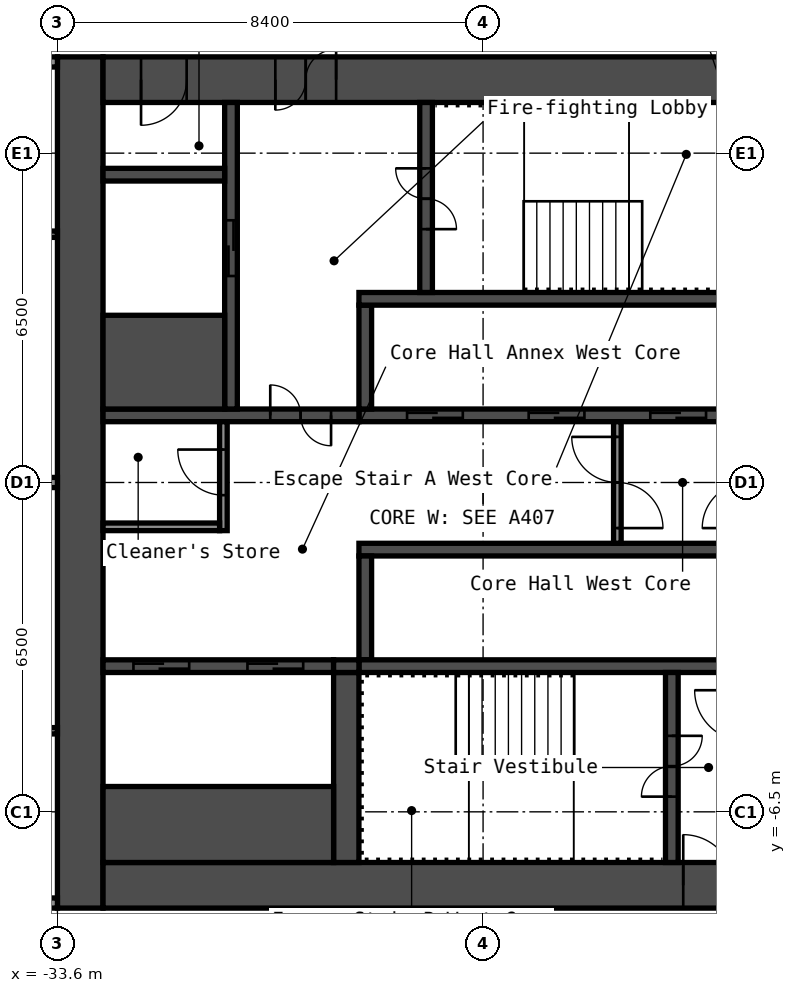
"""IFC4 building model, lengths in metres.
Left out: names, types, materials, properties, quantities, classifications, styles, units other than length and angle.
Written with IfcOpenShell. Run it as: python <this file> out.ifc"""

import sys

from ifc_helpers import new_model, si_unit, direction, frame, frame_2d, origin, place, context, subcontext, project, spatial, rectangle, extrude, element, fill, save


model = new_model("IFC4")
c1 = context("Model", 3, precision=1e-05, world=origin(), true_north=direction((0.0, 1.0)))
c2 = subcontext(c1, "Body", "Model", "MODEL_VIEW")
j1 = project(units=[si_unit("LENGTHUNIT", "METRE"), si_unit("PLANEANGLEUNIT", "RADIAN")], contexts=[c1])
p1 = place(None, origin())
s1 = spatial("IfcSite", under=j1, at=p1, CompositionType="ELEMENT")
p2 = place(p1, origin())
s2 = spatial("IfcBuilding", under=s1, at=p2, CompositionType="ELEMENT")
p3 = place(p2, frame((0.0, 0.0, 51.8)))
s3 = spatial("IfcBuildingStorey", under=s2, at=p3, CompositionType="ELEMENT", Elevation=51.8)
p4 = place(p3, frame((-33.15, -8.4, 0.0), z_axis=(0.0, 0.0, 1.0), x_axis=(0.0, 1.0, 0.0)))
e1 = element("IfcWall", 1, at=p4, inside=s3, PredefinedType="SHEAR", context=c2, shape_type="SweptSolid", body=[
    extrude(rectangle(XDim=16.8, YDim=0.9, at=frame_2d((8.4, 0.0))), origin(), (0.0, 0.0, 1.0), 2.8),
])
p5 = place(p3, frame((-32.7, 7.95, 0.0), z_axis=(0.0, 0.0, 1.0), x_axis=(1.0, 0.0, 0.0)))
e2 = element("IfcWall", 2, at=p5, inside=s3, PredefinedType="SHEAR", context=c2, shape_type="SweptSolid", body=[
    extrude(rectangle(XDim=15.0, YDim=0.9, at=frame_2d((7.5, 0.0))), origin(), (0.0, 0.0, 1.0), 2.8),
])
p6 = place(p5, frame((3.4, 0.0, 0.0)))
e3 = element("IfcOpeningElement", 3, at=p6, cuts=e2, PredefinedType="OPENING", context=c2, shape_type="SweptSolid", body=[
    extrude(rectangle(XDim=1.2, YDim=2.1, at=frame_2d((0.6, 1.05))), frame((0.0, 0.46, 0.0), z_axis=(0.0, -1.0, 0.0), x_axis=(1.0, 0.0, 0.0)), (0.0, 0.0, 1.0), 0.92),
])
p7 = place(p5, frame((0.75, 0.0, 0.0)))
e4 = element("IfcOpeningElement", 4, at=p7, cuts=e2, PredefinedType="OPENING", context=c2, shape_type="SweptSolid", body=[
    extrude(rectangle(XDim=0.9, YDim=2.1, at=frame_2d((0.45, 1.05))), frame((0.0, 0.46, 0.0), z_axis=(0.0, -1.0, 0.0), x_axis=(1.0, 0.0, 0.0)), (0.0, 0.0, 1.0), 0.92),
])
p8 = place(p3, frame((-32.7, -7.95, 0.0), z_axis=(0.0, 0.0, 1.0), x_axis=(1.0, 0.0, 0.0)))
e5 = element("IfcWall", 5, at=p8, inside=s3, PredefinedType="SHEAR", context=c2, shape_type="SweptSolid", body=[
    extrude(rectangle(XDim=15.0, YDim=0.9, at=frame_2d((7.5, 0.0))), origin(), (0.0, 0.0, 1.0), 2.8),
])
p9 = place(p8, frame((11.45, 0.0, 0.0)))
e6 = element("IfcOpeningElement", 6, at=p9, cuts=e5, PredefinedType="OPENING", context=c2, shape_type="SweptSolid", body=[
    extrude(rectangle(XDim=1.0, YDim=2.1, at=frame_2d((0.5, 1.05))), frame((0.0, 0.46, 0.0), z_axis=(0.0, -1.0, 0.0), x_axis=(1.0, 0.0, 0.0)), (0.0, 0.0, 1.0), 0.92),
])
p10 = place(p3, frame((-27.65, 1.325, 0.0), z_axis=(0.0, 0.0, 1.0), x_axis=(1.0, 0.0, 0.0)))
e7 = element("IfcWall", 7, at=p10, inside=s3, PredefinedType="SHEAR", context=c2, shape_type="SweptSolid", body=[
    extrude(rectangle(XDim=7.5, YDim=0.25, at=frame_2d((3.75, 0.0))), origin(), (0.0, 0.0, 1.0), 2.8),
])
p11 = place(p10, frame((5.75, 0.0, 0.0)))
e8 = element("IfcOpeningElement", 8, at=p11, cuts=e7, PredefinedType="OPENING", context=c2, shape_type="SweptSolid", body=[
    extrude(rectangle(XDim=1.1, YDim=2.1, at=frame_2d((0.55, 1.05))), frame((0.0, 0.135, 0.0), z_axis=(0.0, -1.0, 0.0), x_axis=(1.0, 0.0, 0.0)), (0.0, 0.0, 1.0), 0.27),
])
p12 = place(p10, frame((3.35, 0.0, 0.0)))
e9 = element("IfcOpeningElement", 9, at=p12, cuts=e7, PredefinedType="OPENING", context=c2, shape_type="SweptSolid", body=[
    extrude(rectangle(XDim=1.1, YDim=2.1, at=frame_2d((0.55, 1.05))), frame((0.0, 0.135, 0.0), z_axis=(0.0, -1.0, 0.0), x_axis=(1.0, 0.0, 0.0)), (0.0, 0.0, 1.0), 0.27),
])
p13 = place(p10, frame((0.95, 0.0, 0.0)))
e10 = element("IfcOpeningElement", 10, at=p13, cuts=e7, PredefinedType="OPENING", context=c2, shape_type="SweptSolid", body=[
    extrude(rectangle(XDim=1.1, YDim=2.1, at=frame_2d((0.55, 1.05))), frame((0.0, 0.135, 0.0), z_axis=(0.0, -1.0, 0.0), x_axis=(1.0, 0.0, 0.0)), (0.0, 0.0, 1.0), 0.27),
])
p14 = place(p3, frame((-27.525, 1.45, 0.0), z_axis=(0.0, 0.0, 1.0), x_axis=(0.0, 1.0, 0.0)))
e11 = element("IfcWall", 11, at=p14, inside=s3, PredefinedType="SHEAR", context=c2, shape_type="SweptSolid", body=[
    extrude(rectangle(XDim=2.05, YDim=0.25, at=frame_2d((1.025, 0.0))), origin(), (0.0, 0.0, 1.0), 2.8),
])
p15 = place(p3, frame((-27.65, 3.625, 0.0), z_axis=(0.0, 0.0, 1.0), x_axis=(1.0, 0.0, 0.0)))
e12 = element("IfcWall", 12, at=p15, inside=s3, PredefinedType="SHEAR", context=c2, shape_type="SweptSolid", body=[
    extrude(rectangle(XDim=7.5, YDim=0.25, at=frame_2d((3.75, 0.0))), origin(), (0.0, 0.0, 1.0), 2.8),
])
p16 = place(p3, frame((-26.325, 3.75, 0.0), z_axis=(0.0, 0.0, 1.0), x_axis=(0.0, 1.0, 0.0)))
e13 = element("IfcWall", 13, at=p16, inside=s3, PredefinedType="SHEAR", context=c2, shape_type="SweptSolid", body=[
    extrude(rectangle(XDim=3.75, YDim=0.25, at=frame_2d((1.875, 0.0))), origin(), (0.0, 0.0, 1.0), 2.8),
])
p17 = place(p16, frame((1.25, 0.0, 0.0)))
e14 = element("IfcOpeningElement", 14, at=p17, cuts=e13, PredefinedType="OPENING", context=c2, shape_type="SweptSolid", body=[
    extrude(rectangle(XDim=1.2, YDim=2.1, at=frame_2d((0.6, 1.05))), frame((0.0, 0.135, 0.0), z_axis=(0.0, -1.0, 0.0), x_axis=(1.0, 0.0, 0.0)), (0.0, 0.0, 1.0), 0.27),
])
p18 = place(p3, frame((-32.7, 1.325, 0.0), z_axis=(0.0, 0.0, 1.0), x_axis=(1.0, 0.0, 0.0)))
e15 = element("IfcWall", 15, at=p18, inside=s3, PredefinedType="SHEAR", context=c2, shape_type="SweptSolid", body=[
    extrude(rectangle(XDim=5.05, YDim=0.25, at=frame_2d((2.525, 0.0))), origin(), (0.0, 0.0, 1.0), 2.8),
])
p19 = place(p18, frame((3.3, 0.0, 0.0)))
e16 = element("IfcOpeningElement", 16, at=p19, cuts=e15, PredefinedType="OPENING", context=c2, shape_type="SweptSolid", body=[
    extrude(rectangle(XDim=1.2, YDim=2.1, at=frame_2d((0.6, 1.05))), frame((0.0, 0.135, 0.0), z_axis=(0.0, -1.0, 0.0), x_axis=(1.0, 0.0, 0.0)), (0.0, 0.0, 1.0), 0.27),
])
p20 = place(p3, frame((-30.175, 1.45, 0.0), z_axis=(0.0, 0.0, 1.0), x_axis=(0.0, 1.0, 0.0)))
e17 = element("IfcWall", 17, at=p20, inside=s3, PredefinedType="SHEAR", context=c2, shape_type="SweptSolid", body=[
    extrude(rectangle(XDim=6.05, YDim=0.25, at=frame_2d((3.025, 0.0))), origin(), (0.0, 0.0, 1.0), 2.8),
])
p21 = place(p20, frame((2.625, 0.0, 0.0)))
e18 = element("IfcOpeningElement", 18, at=p21, cuts=e17, PredefinedType="OPENING", context=c2, shape_type="SweptSolid", body=[
    extrude(rectangle(XDim=1.1, YDim=2.1, at=frame_2d((0.55, 1.05))), frame((0.0, 0.135, 0.0), z_axis=(0.0, -1.0, 0.0), x_axis=(1.0, 0.0, 0.0)), (0.0, 0.0, 1.0), 0.27),
])
p22 = place(p3, frame((-32.7, 2.375, 0.0), z_axis=(0.0, 0.0, 1.0), x_axis=(1.0, 0.0, 0.0)))
e19 = element("IfcWall", 19, at=p22, inside=s3, PredefinedType="SHEAR", context=c2, shape_type="SweptSolid", body=[
    extrude(rectangle(XDim=2.4, YDim=1.85, at=frame_2d((1.2, 0.0))), origin(), (0.0, 0.0, 1.0), 2.8),
])
p23 = place(p3, frame((-32.7, 6.075, 0.0), z_axis=(0.0, 0.0, 1.0), x_axis=(1.0, 0.0, 0.0)))
e20 = element("IfcWall", 20, at=p23, inside=s3, PredefinedType="SHEAR", context=c2, shape_type="SweptSolid", body=[
    extrude(rectangle(XDim=2.4, YDim=0.25, at=frame_2d((1.2, 0.0))), origin(), (0.0, 0.0, 1.0), 2.8),
])
p24 = place(p3, frame((-27.65, -1.325, 0.0), z_axis=(0.0, 0.0, 1.0), x_axis=(1.0, 0.0, 0.0)))
e21 = element("IfcWall", 21, at=p24, inside=s3, PredefinedType="SHEAR", context=c2, shape_type="SweptSolid", body=[
    extrude(rectangle(XDim=7.5, YDim=0.25, at=frame_2d((3.75, 0.0))), origin(), (0.0, 0.0, 1.0), 2.8),
])
p25 = place(p3, frame((-27.525, -3.5, 0.0), z_axis=(0.0, 0.0, 1.0), x_axis=(0.0, 1.0, 0.0)))
e22 = element("IfcWall", 22, at=p25, inside=s3, PredefinedType="SHEAR", context=c2, shape_type="SweptSolid", body=[
    extrude(rectangle(XDim=2.05, YDim=0.25, at=frame_2d((1.025, 0.0))), origin(), (0.0, 0.0, 1.0), 2.8),
])
p26 = place(p3, frame((-27.65, -3.625, 0.0), z_axis=(0.0, 0.0, 1.0), x_axis=(1.0, 0.0, 0.0)))
e23 = element("IfcWall", 23, at=p26, inside=s3, PredefinedType="SHEAR", context=c2, shape_type="SweptSolid", body=[
    extrude(rectangle(XDim=7.5, YDim=0.25, at=frame_2d((3.75, 0.0))), origin(), (0.0, 0.0, 1.0), 2.8),
])
p27 = place(p3, frame((-21.475, -7.5, 0.0), z_axis=(0.0, 0.0, 1.0), x_axis=(0.0, 1.0, 0.0)))
e24 = element("IfcWall", 24, at=p27, inside=s3, PredefinedType="SHEAR", context=c2, shape_type="SweptSolid", body=[
    extrude(rectangle(XDim=3.75, YDim=0.25, at=frame_2d((1.875, 0.0))), origin(), (0.0, 0.0, 1.0), 2.8),
])
p28 = place(p27, frame((1.3, 0.0, 0.0)))
e25 = element("IfcOpeningElement", 25, at=p28, cuts=e24, PredefinedType="OPENING", context=c2, shape_type="SweptSolid", body=[
    extrude(rectangle(XDim=1.2, YDim=2.1, at=frame_2d((0.6, 1.05))), frame((0.0, 0.135, 0.0), z_axis=(0.0, -1.0, 0.0), x_axis=(1.0, 0.0, 0.0)), (0.0, 0.0, 1.0), 0.27),
])
p29 = place(p3, frame((-27.9, -7.5, 0.0), z_axis=(0.0, 0.0, 1.0), x_axis=(0.0, 1.0, 0.0)))
e26 = element("IfcWall", 26, at=p29, inside=s3, PredefinedType="SHEAR", context=c2, shape_type="SweptSolid", body=[
    extrude(rectangle(XDim=3.75, YDim=0.5, at=frame_2d((1.875, 0.0))), origin(), (0.0, 0.0, 1.0), 2.8),
])
p30 = place(p3, frame((-32.7, -3.625, 0.0), z_axis=(0.0, 0.0, 1.0), x_axis=(1.0, 0.0, 0.0)))
e27 = element("IfcWall", 27, at=p30, inside=s3, PredefinedType="SHEAR", context=c2, shape_type="SweptSolid", body=[
    extrude(rectangle(XDim=4.55, YDim=0.25, at=frame_2d((2.275, 0.0))), origin(), (0.0, 0.0, 1.0), 2.8),
])
p31 = place(p30, frame((2.85, 0.0, 0.0)))
e28 = element("IfcOpeningElement", 28, at=p31, cuts=e27, PredefinedType="OPENING", context=c2, shape_type="SweptSolid", body=[
    extrude(rectangle(XDim=1.1, YDim=2.1, at=frame_2d((0.55, 1.05))), frame((0.0, 0.135, 0.0), z_axis=(0.0, -1.0, 0.0), x_axis=(1.0, 0.0, 0.0)), (0.0, 0.0, 1.0), 0.27),
])
p32 = place(p30, frame((0.6, 0.0, 0.0)))
e29 = element("IfcOpeningElement", 29, at=p32, cuts=e27, PredefinedType="OPENING", context=c2, shape_type="SweptSolid", body=[
    extrude(rectangle(XDim=1.1, YDim=2.1, at=frame_2d((0.55, 1.05))), frame((0.0, 0.135, 0.0), z_axis=(0.0, -1.0, 0.0), x_axis=(1.0, 0.0, 0.0)), (0.0, 0.0, 1.0), 0.27),
])
p33 = place(p3, frame((-32.7, -6.75, 0.0), z_axis=(0.0, 0.0, 1.0), x_axis=(1.0, 0.0, 0.0)))
e30 = element("IfcWall", 30, at=p33, inside=s3, PredefinedType="SHEAR", context=c2, shape_type="SweptSolid", body=[
    extrude(rectangle(XDim=4.55, YDim=1.5, at=frame_2d((2.275, 0.0))), origin(), (0.0, 0.0, 1.0), 2.8),
])
p34 = place(p3, frame((-28.15, -3.625, 0.0), z_axis=(0.0, 0.0, 1.0), x_axis=(1.0, 0.0, 0.0)))
e31 = element("IfcWall", 31, at=p34, inside=s3, PredefinedType="SHEAR", context=c2, shape_type="SweptSolid", body=[
    extrude(rectangle(XDim=0.5, YDim=0.25, at=frame_2d((0.25, 0.0))), origin(), (0.0, 0.0, 1.0), 2.8),
])
p35 = place(p3, frame((-22.55, -1.2, 0.0), z_axis=(0.0, 0.0, 1.0), x_axis=(0.0, 1.0, 0.0)))
e32 = element("IfcWall", 32, at=p35, inside=s3, PredefinedType="PARTITIONING", context=c2, shape_type="SweptSolid", body=[
    extrude(rectangle(XDim=2.4, YDim=0.15, at=frame_2d((1.2, 0.0))), origin(), (0.0, 0.0, 1.0), 2.8),
])
p36 = place(p35, frame((0.3, 0.0, 0.0)))
e33 = element("IfcOpeningElement", 33, at=p36, cuts=e32, PredefinedType="OPENING", context=c2, shape_type="SweptSolid", body=[
    extrude(rectangle(XDim=1.8, YDim=2.1, at=frame_2d((0.9, 1.05))), frame((0.0, 0.085, 0.0), z_axis=(0.0, -1.0, 0.0), x_axis=(1.0, 0.0, 0.0)), (0.0, 0.0, 1.0), 0.17),
])
p37 = place(p3, frame((-30.325, -0.95, 0.0), z_axis=(0.0, 0.0, 1.0), x_axis=(0.0, 1.0, 0.0)))
e34 = element("IfcWall", 34, at=p37, inside=s3, PredefinedType="PARTITIONING", context=c2, shape_type="SweptSolid", body=[
    extrude(rectangle(XDim=2.15, YDim=0.15, at=frame_2d((1.075, 0.0))), origin(), (0.0, 0.0, 1.0), 2.8),
])
p38 = place(p37, frame((0.7, 0.0, 0.0)))
e35 = element("IfcOpeningElement", 35, at=p38, cuts=e34, PredefinedType="OPENING", context=c2, shape_type="SweptSolid", body=[
    extrude(rectangle(XDim=0.9, YDim=2.1, at=frame_2d((0.45, 1.05))), frame((0.0, 0.085, 0.0), z_axis=(0.0, -1.0, 0.0), x_axis=(1.0, 0.0, 0.0)), (0.0, 0.0, 1.0), 0.17),
])
p39 = place(p3, frame((-32.7, -0.875, 0.0), z_axis=(0.0, 0.0, 1.0), x_axis=(1.0, 0.0, 0.0)))
e36 = element("IfcWall", 36, at=p39, inside=s3, PredefinedType="PARTITIONING", context=c2, shape_type="SweptSolid", body=[
    extrude(rectangle(XDim=2.3, YDim=0.15, at=frame_2d((1.15, 0.0))), origin(), (0.0, 0.0, 1.0), 2.8),
])
p40 = place(p3, frame((-48.6, -8.3, 0.0), z_axis=(0.0, 0.0, 1.0), x_axis=(1.0, 0.0, 0.0)))
e37 = element("IfcWall", 37, at=p40, inside=s3, PredefinedType="PARTITIONING", context=c2, shape_type="SweptSolid", body=[
    extrude(rectangle(XDim=15.0, YDim=0.2, at=frame_2d((7.5, 0.0))), origin(), (0.0, 0.0, 1.0), 2.8),
])
p41 = place(p40, frame((1.15, 0.0, 0.0)))
e38 = element("IfcOpeningElement", 38, at=p41, cuts=e37, PredefinedType="OPENING", context=c2, shape_type="SweptSolid", body=[
    extrude(rectangle(XDim=1.0, YDim=2.1, at=frame_2d((0.5, 1.05))), frame((0.0, 0.11, 0.0), z_axis=(0.0, -1.0, 0.0), x_axis=(1.0, 0.0, 0.0)), (0.0, 0.0, 1.0), 0.22),
])
p42 = place(p40, frame((8.6, 0.0, 0.0)))
e39 = element("IfcOpeningElement", 39, at=p42, cuts=e37, PredefinedType="OPENING", context=c2, shape_type="SweptSolid", body=[
    extrude(rectangle(XDim=1.0, YDim=2.1, at=frame_2d((0.5, 1.05))), frame((0.0, 0.11, 0.0), z_axis=(0.0, -1.0, 0.0), x_axis=(1.0, 0.0, 0.0)), (0.0, 0.0, 1.0), 0.22),
])
p43 = place(p3, frame((-36.938, -4.9, 0.0), z_axis=(0.0, 0.0, 1.0), x_axis=(1.0, 0.0, 0.0)))
e40 = element("IfcWall", 40, at=p43, inside=s3, PredefinedType="PARTITIONING", context=c2, shape_type="SweptSolid", body=[
    extrude(rectangle(XDim=3.337, YDim=0.125, at=frame_2d((1.669, 0.0))), origin(), (0.0, 0.0, 1.0), 2.8),
])
p44 = place(p43, frame((1.238, 0.0, 0.0)))
e41 = element("IfcOpeningElement", 41, at=p44, cuts=e40, PredefinedType="OPENING", context=c2, shape_type="SweptSolid", body=[
    extrude(rectangle(XDim=0.8, YDim=2.1, at=frame_2d((0.4, 1.05))), frame((0.0, 0.073, 0.0), z_axis=(0.0, -1.0, 0.0), x_axis=(1.0, 0.0, 0.0)), (0.0, 0.0, 1.0), 0.145),
])
p45 = place(p3, frame((-48.5, 0.0, 0.0), z_axis=(0.0, 0.0, 1.0), x_axis=(1.0, 0.0, 0.0)))
e42 = element("IfcWall", 42, at=p45, inside=s3, PredefinedType="PARTITIONING", context=c2, shape_type="SweptSolid", body=[
    extrude(rectangle(XDim=14.9, YDim=0.2, at=frame_2d((7.45, 0.0))), origin(), (0.0, 0.0, 1.0), 2.8),
])
p46 = place(p3, frame((-36.938, 4.9, 0.0), z_axis=(0.0, 0.0, 1.0), x_axis=(1.0, 0.0, 0.0)))
e43 = element("IfcWall", 43, at=p46, inside=s3, PredefinedType="PARTITIONING", context=c2, shape_type="SweptSolid", body=[
    extrude(rectangle(XDim=3.337, YDim=0.125, at=frame_2d((1.669, 0.0))), origin(), (0.0, 0.0, 1.0), 2.8),
])
p47 = place(p46, frame((1.238, 0.0, 0.0)))
e44 = element("IfcOpeningElement", 44, at=p47, cuts=e43, PredefinedType="OPENING", context=c2, shape_type="SweptSolid", body=[
    extrude(rectangle(XDim=0.8, YDim=2.1, at=frame_2d((0.4, 1.05))), frame((0.0, 0.073, 0.0), z_axis=(0.0, -1.0, 0.0), x_axis=(1.0, 0.0, 0.0)), (0.0, 0.0, 1.0), 0.145),
])
p48 = place(p3, frame((-48.6, 8.3, 0.0), z_axis=(0.0, 0.0, 1.0), x_axis=(1.0, 0.0, 0.0)))
e45 = element("IfcWall", 45, at=p48, inside=s3, PredefinedType="PARTITIONING", context=c2, shape_type="SweptSolid", body=[
    extrude(rectangle(XDim=15.0, YDim=0.2, at=frame_2d((7.5, 0.0))), origin(), (0.0, 0.0, 1.0), 2.8),
])
p49 = place(p48, frame((4.45, 0.0, 0.0)))
e46 = element("IfcOpeningElement", 46, at=p49, cuts=e45, PredefinedType="OPENING", context=c2, shape_type="SweptSolid", body=[
    extrude(rectangle(XDim=1.0, YDim=2.1, at=frame_2d((0.5, 1.05))), frame((0.0, 0.11, 0.0), z_axis=(0.0, -1.0, 0.0), x_axis=(1.0, 0.0, 0.0)), (0.0, 0.0, 1.0), 0.22),
])
p50 = place(p48, frame((8.6, 0.0, 0.0)))
e47 = element("IfcOpeningElement", 47, at=p50, cuts=e45, PredefinedType="OPENING", context=c2, shape_type="SweptSolid", body=[
    extrude(rectangle(XDim=1.0, YDim=2.1, at=frame_2d((0.5, 1.05))), frame((0.0, 0.11, 0.0), z_axis=(0.0, -1.0, 0.0), x_axis=(1.0, 0.0, 0.0)), (0.0, 0.0, 1.0), 0.22),
])
p51 = place(p6, origin())
e48 = element("IfcDoor", 48, at=p51, inside=s3, OperationType="DOUBLE_DOOR_SINGLE_SWING", PredefinedType="DOOR", context=c2, shape_type="SweptSolid", body=[
    extrude(rectangle(XDim=1.2, YDim=2.1, at=frame_2d((0.6, 1.05))), frame((0.0, 0.025, 0.0), z_axis=(0.0, -1.0, 0.0), x_axis=(1.0, 0.0, 0.0)), (0.0, 0.0, 1.0), 0.05),
])
fill(e3, e48)
p52 = place(p7, origin())
e49 = element("IfcDoor", 49, at=p52, inside=s3, OperationType="SINGLE_SWING_LEFT", PredefinedType="DOOR", context=c2, shape_type="SweptSolid", body=[
    extrude(rectangle(XDim=0.9, YDim=2.1, at=frame_2d((0.45, 1.05))), frame((0.0, 0.025, 0.0), z_axis=(0.0, -1.0, 0.0), x_axis=(1.0, 0.0, 0.0)), (0.0, 0.0, 1.0), 0.05),
])
fill(e4, e49)
p53 = place(p9, origin())
e50 = element("IfcDoor", 50, at=p53, inside=s3, OperationType="SINGLE_SWING_RIGHT", PredefinedType="DOOR", context=c2, shape_type="SweptSolid", body=[
    extrude(rectangle(XDim=1.0, YDim=2.1, at=frame_2d((0.5, 1.05))), frame((0.0, 0.025, 0.0), z_axis=(0.0, -1.0, 0.0), x_axis=(1.0, 0.0, 0.0)), (0.0, 0.0, 1.0), 0.05),
])
fill(e6, e50)
p54 = place(p17, origin())
e51 = element("IfcDoor", 51, at=p54, inside=s3, OperationType="DOUBLE_DOOR_SINGLE_SWING", PredefinedType="DOOR", context=c2, shape_type="SweptSolid", body=[
    extrude(rectangle(XDim=1.2, YDim=2.1, at=frame_2d((0.6, 1.05))), frame((0.0, 0.025, 0.0), z_axis=(0.0, -1.0, 0.0), x_axis=(1.0, 0.0, 0.0)), (0.0, 0.0, 1.0), 0.05),
])
fill(e14, e51)
p55 = place(p28, origin())
e52 = element("IfcDoor", 52, at=p55, inside=s3, OperationType="DOUBLE_DOOR_SINGLE_SWING", PredefinedType="DOOR", context=c2, shape_type="SweptSolid", body=[
    extrude(rectangle(XDim=1.2, YDim=2.1, at=frame_2d((0.6, 1.05))), frame((0.0, 0.025, 0.0), z_axis=(0.0, -1.0, 0.0), x_axis=(1.0, 0.0, 0.0)), (0.0, 0.0, 1.0), 0.05),
])
fill(e25, e52)
p56 = place(p19, origin())
e53 = element("IfcDoor", 53, at=p56, inside=s3, OperationType="DOUBLE_DOOR_SINGLE_SWING", PredefinedType="DOOR", context=c2, shape_type="SweptSolid", body=[
    extrude(rectangle(XDim=1.2, YDim=2.1, at=frame_2d((0.6, 1.05))), frame((0.0, 0.025, 0.0), z_axis=(0.0, -1.0, 0.0), x_axis=(1.0, 0.0, 0.0)), (0.0, 0.0, 1.0), 0.05),
])
fill(e16, e53)
p57 = place(p36, origin())
e54 = element("IfcDoor", 54, at=p57, inside=s3, OperationType="DOUBLE_DOOR_SINGLE_SWING", PredefinedType="DOOR", context=c2, shape_type="SweptSolid", body=[
    extrude(rectangle(XDim=1.8, YDim=2.1, at=frame_2d((0.9, 1.05))), frame((0.0, 0.025, 0.0), z_axis=(0.0, -1.0, 0.0), x_axis=(1.0, 0.0, 0.0)), (0.0, 0.0, 1.0), 0.05),
])
fill(e33, e54)
p58 = place(p38, origin())
e55 = element("IfcDoor", 55, at=p58, inside=s3, OperationType="SINGLE_SWING_LEFT", PredefinedType="DOOR", context=c2, shape_type="SweptSolid", body=[
    extrude(rectangle(XDim=0.9, YDim=2.1, at=frame_2d((0.45, 1.05))), frame((0.0, 0.025, 0.0), z_axis=(0.0, -1.0, 0.0), x_axis=(1.0, 0.0, 0.0)), (0.0, 0.0, 1.0), 0.05),
])
fill(e35, e55)
p59 = place(p11, origin())
e56 = element("IfcDoor", 56, at=p59, inside=s3, OperationType="DOUBLE_DOOR_SLIDING", PredefinedType="DOOR", context=c2, shape_type="SweptSolid", body=[
    extrude(rectangle(XDim=1.1, YDim=2.1, at=frame_2d((0.55, 1.05))), frame((0.0, 0.025, 0.0), z_axis=(0.0, -1.0, 0.0), x_axis=(1.0, 0.0, 0.0)), (0.0, 0.0, 1.0), 0.05),
])
fill(e8, e56)
p60 = place(p12, origin())
e57 = element("IfcDoor", 57, at=p60, inside=s3, OperationType="DOUBLE_DOOR_SLIDING", PredefinedType="DOOR", context=c2, shape_type="SweptSolid", body=[
    extrude(rectangle(XDim=1.1, YDim=2.1, at=frame_2d((0.55, 1.05))), frame((0.0, 0.025, 0.0), z_axis=(0.0, -1.0, 0.0), x_axis=(1.0, 0.0, 0.0)), (0.0, 0.0, 1.0), 0.05),
])
fill(e9, e57)
p61 = place(p13, origin())
e58 = element("IfcDoor", 58, at=p61, inside=s3, OperationType="DOUBLE_DOOR_SLIDING", PredefinedType="DOOR", context=c2, shape_type="SweptSolid", body=[
    extrude(rectangle(XDim=1.1, YDim=2.1, at=frame_2d((0.55, 1.05))), frame((0.0, 0.025, 0.0), z_axis=(0.0, -1.0, 0.0), x_axis=(1.0, 0.0, 0.0)), (0.0, 0.0, 1.0), 0.05),
])
fill(e10, e58)
p62 = place(p21, origin())
e59 = element("IfcDoor", 59, at=p62, inside=s3, OperationType="DOUBLE_DOOR_SLIDING", PredefinedType="DOOR", context=c2, shape_type="SweptSolid", body=[
    extrude(rectangle(XDim=1.1, YDim=2.1, at=frame_2d((0.55, 1.05))), frame((0.0, 0.025, 0.0), z_axis=(0.0, -1.0, 0.0), x_axis=(1.0, 0.0, 0.0)), (0.0, 0.0, 1.0), 0.05),
])
fill(e18, e59)
p63 = place(p31, origin())
e60 = element("IfcDoor", 60, at=p63, inside=s3, OperationType="DOUBLE_DOOR_SLIDING", PredefinedType="DOOR", context=c2, shape_type="SweptSolid", body=[
    extrude(rectangle(XDim=1.1, YDim=2.1, at=frame_2d((0.55, 1.05))), frame((0.0, 0.025, 0.0), z_axis=(0.0, -1.0, 0.0), x_axis=(1.0, 0.0, 0.0)), (0.0, 0.0, 1.0), 0.05),
])
fill(e28, e60)
p64 = place(p32, origin())
e61 = element("IfcDoor", 61, at=p64, inside=s3, OperationType="DOUBLE_DOOR_SLIDING", PredefinedType="DOOR", context=c2, shape_type="SweptSolid", body=[
    extrude(rectangle(XDim=1.1, YDim=2.1, at=frame_2d((0.55, 1.05))), frame((0.0, 0.025, 0.0), z_axis=(0.0, -1.0, 0.0), x_axis=(1.0, 0.0, 0.0)), (0.0, 0.0, 1.0), 0.05),
])
fill(e29, e61)
save(model, sys.argv[1])
